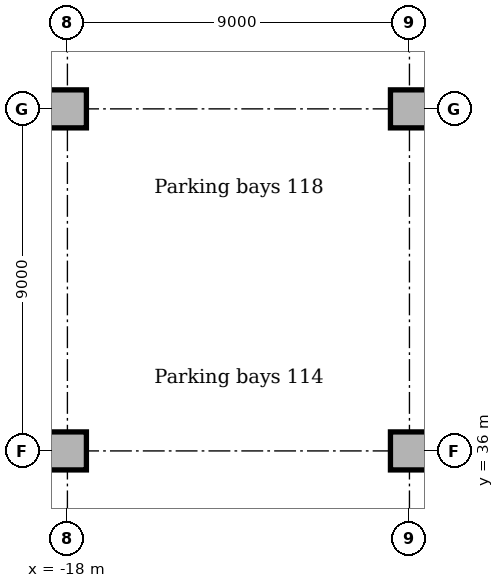
"""IFC4 building model, lengths in metres.
Left out: names, types, materials, properties, quantities, classifications, styles, units other than length and angle.
Written with IfcOpenShell. Run it as: python <this file> out.ifc"""

import sys

from ifc_helpers import new_model, si_unit, direction, frame, origin, origin_2d, place, context, subcontext, project, spatial, rectangle, extrude, element, save


model = new_model("IFC4")
c1 = context("Model", 3, precision=1e-05, world=origin(), true_north=direction((0.0, 1.0)))
c2 = subcontext(c1, "Body", "Model", "MODEL_VIEW")
j1 = project(units=[si_unit("LENGTHUNIT", "METRE"), si_unit("PLANEANGLEUNIT", "RADIAN")], contexts=[c1])
p1 = place(None, origin())
s1 = spatial("IfcSite", under=j1, at=p1, CompositionType="ELEMENT")
p2 = place(p1, origin())
s2 = spatial("IfcBuilding", under=s1, at=p2, CompositionType="ELEMENT")
p3 = place(p2, frame((0.0, 0.0, -5.0)))
s3 = spatial("IfcBuildingStorey", under=s2, at=p3, CompositionType="ELEMENT", Elevation=-5.0)
for number, where, z_axis, x_axis in (
    (1, (-18.0, 36.0, 0.0), (0.0, 0.0, 1.0), (1.0, 0.0, 0.0)),
    (2, (-18.0, 45.0, 0.0), (0.0, 0.0, 1.0), (1.0, 0.0, 0.0)),
    (3, (-9.0, 36.0, 0.0), (0.0, 0.0, 1.0), (1.0, 0.0, 0.0)),
    (4, (-9.0, 45.0, 0.0), (0.0, 0.0, 1.0), (1.0, 0.0, 0.0)),
):
    element("IfcColumn", number, at=place(p3, frame(where, z_axis=z_axis, x_axis=x_axis)), inside=s3, PredefinedType="COLUMN", context=c2, shape_type="SweptSolid", body=[
        extrude(rectangle(XDim=1.0, YDim=1.0, at=origin_2d()), origin(), (0.0, 0.0, 1.0), 4.7),
    ])
save(model, sys.argv[1])
